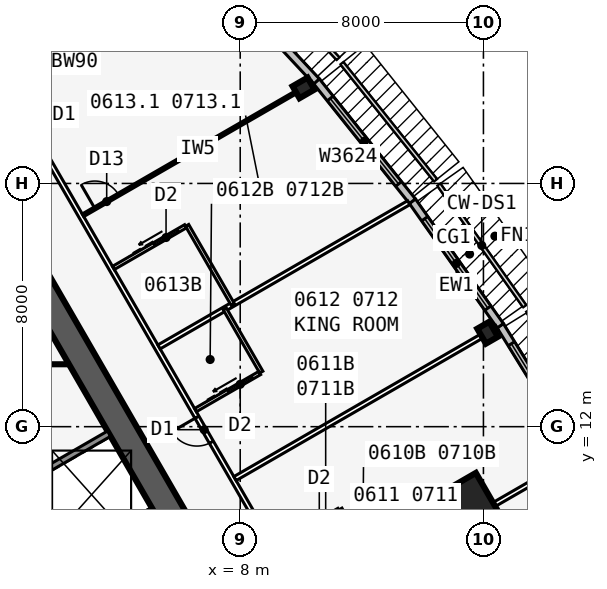
"""IFC4 building model, lengths in metres.
Left out: names, types, materials, properties, quantities, classifications, styles, units other than length and angle.
Written with IfcOpenShell. Run it as: python <this file> out.ifc"""

import sys

from ifc_helpers import new_model, si_unit, direction, frame, frame_2d, origin, origin_2d, place, context, subcontext, project, spatial, rectangle, i_section, extrude, element, fill, save


model = new_model("IFC4")
c1 = context("Model", 3, precision=1e-05, world=origin(), true_north=direction((0.0, 1.0)))
c2 = subcontext(c1, "Body", "Model", "MODEL_VIEW")
j1 = project(units=[si_unit("LENGTHUNIT", "METRE"), si_unit("PLANEANGLEUNIT", "RADIAN")], contexts=[c1])
p1 = place(None, origin())
s1 = spatial("IfcSite", under=j1, at=p1, CompositionType="ELEMENT")
p2 = place(p1, origin())
s2 = spatial("IfcBuilding", under=s1, at=p2, CompositionType="ELEMENT")
p3 = place(p2, frame((0.0, 0.0, 31.9)))
s3 = spatial("IfcBuildingStorey", under=s2, at=p3, CompositionType="ELEMENT", Elevation=31.9)
p4 = place(p3, frame((16.5, -9.526, 0.0), z_axis=(0.0, 0.0, 1.0), x_axis=(-0.499999749417, 0.866025548458, 0.0)))
e1 = element("IfcWall", 1, at=p4, inside=s3, PredefinedType="SHEAR", context=c2, shape_type="SweptSolid", body=[
    extrude(rectangle(XDim=33.0, YDim=0.9, at=frame_2d((16.5, 0.0))), origin(), (0.0, 0.0, 1.0), 3.4),
])
p5 = place(p4, frame((14.15, 0.0, 0.0)))
e2 = element("IfcOpeningElement", 2, at=p5, cuts=e1, PredefinedType="OPENING", context=c2, shape_type="SweptSolid", body=[
    extrude(rectangle(XDim=1.8, YDim=2.13, at=frame_2d((0.9, 1.065))), frame((0.0, 0.46, 0.0), z_axis=(0.0, -1.0, 0.0), x_axis=(1.0, 0.0, 0.0)), (0.0, 0.0, 1.0), 0.92),
])
p6 = place(p4, frame((12.6, 0.0, 0.0)))
e3 = element("IfcOpeningElement", 3, at=p6, cuts=e1, PredefinedType="OPENING", context=c2, shape_type="SweptSolid", body=[
    extrude(rectangle(XDim=1.0, YDim=2.13, at=frame_2d((0.5, 1.065))), frame((0.0, 0.46, 0.0), z_axis=(0.0, -1.0, 0.0), x_axis=(1.0, 0.0, 0.0)), (0.0, 0.0, 1.0), 0.92),
])
p7 = place(p3, frame((5.379, 2.586, 0.0), z_axis=(0.0, 0.0, 1.0), x_axis=(-0.500001375892, 0.866024609411, 0.0)))
e4 = element("IfcWall", 4, at=p7, inside=s3, PredefinedType="SOLIDWALL", context=c2, shape_type="SweptSolid", body=[
    extrude(rectangle(XDim=10.633, YDim=0.25, at=frame_2d((5.316, 0.0))), origin(), (0.0, 0.0, 1.0), 3.235),
])
p8 = place(p7, frame((9.164, 0.0, 0.0)))
e5 = element("IfcOpeningElement", 5, at=p8, cuts=e4, PredefinedType="OPENING", context=c2, shape_type="SweptSolid", body=[
    extrude(rectangle(XDim=0.9, YDim=2.13, at=frame_2d((0.45, 1.065))), frame((0.0, 0.135, 0.0), z_axis=(0.0, -1.0, 0.0), x_axis=(1.0, 0.0, 0.0)), (0.0, 0.0, 1.0), 0.27),
])
p9 = place(p7, frame((1.0, 0.0, 0.0)))
e6 = element("IfcOpeningElement", 6, at=p9, cuts=e4, PredefinedType="OPENING", context=c2, shape_type="SweptSolid", body=[
    extrude(rectangle(XDim=1.1, YDim=2.13, at=frame_2d((0.55, 1.065))), frame((0.0, 0.135, 0.0), z_axis=(0.0, -1.0, 0.0), x_axis=(1.0, 0.0, 0.0)), (0.0, 0.0, 1.0), 0.27),
])
p10 = place(p7, frame((3.9, 0.0, 0.0)))
e7 = element("IfcOpeningElement", 7, at=p10, cuts=e4, PredefinedType="OPENING", context=c2, shape_type="SweptSolid", body=[
    extrude(rectangle(XDim=1.1, YDim=2.13, at=frame_2d((0.55, 1.065))), frame((0.0, 0.135, 0.0), z_axis=(0.0, -1.0, 0.0), x_axis=(1.0, 0.0, 0.0)), (0.0, 0.0, 1.0), 0.27),
])
p11 = place(p7, frame((6.8, 0.0, 0.0)))
e8 = element("IfcOpeningElement", 8, at=p11, cuts=e4, PredefinedType="OPENING", context=c2, shape_type="SweptSolid", body=[
    extrude(rectangle(XDim=1.1, YDim=2.13, at=frame_2d((0.55, 1.065))), frame((0.0, 0.135, 0.0), z_axis=(0.0, -1.0, 0.0), x_axis=(1.0, 0.0, 0.0)), (0.0, 0.0, 1.0), 0.27),
])
for number, where, z_axis, x_axis in (
    (9, (2.429, 7.696, 0.0), (0.0, 0.0, 1.0), (0.866, 0.5, 0.0)),
    (10, (0.979, 10.207, 0.0), (0.0, 0.0, 1.0), (0.866, 0.5, 0.0)),
):
    element("IfcWall", number, at=place(p3, frame(where, z_axis=z_axis, x_axis=x_axis)), inside=s3, PredefinedType="SOLIDWALL", context=c2, shape_type="SweptSolid", body=[
        extrude(rectangle(XDim=3.125, YDim=0.2, at=frame_2d((1.562, 0.0))), origin(), (0.0, 0.0, 1.0), 3.235),
    ])
for number, where, z_axis, x_axis in (
    (11, (16.137, 15.09, 0.0), (0.0, 0.0, 1.0), (0.866, 0.5, 0.0)),
    (12, (10.083, 23.142, 0.0), (0.0, 0.0, 1.0), (-0.5, 0.866, 0.0)),
):
    element("IfcColumn", number, at=place(p3, frame(where, z_axis=z_axis, x_axis=x_axis)), inside=s3, PredefinedType="COLUMN", context=c2, shape_type="SweptSolid", body=[
        extrude(i_section(OverallWidth=0.455, OverallDepth=0.569, WebThickness=0.078, FlangeThickness=0.125, at=origin_2d()), origin(), (0.0, 0.0, 1.0), 3.4),
    ])
p12 = place(p3, frame((15.312, 8.84, 0.0), z_axis=(0.0, 0.0, 1.0), x_axis=(0.866025403784, 0.5, 0.0)))
e13 = element("IfcColumn", 13, at=p12, inside=s3, PredefinedType="COLUMN", context=c2, shape_type="SweptSolid", body=[
    extrude(rectangle(XDim=2.4, YDim=2.4, at=origin_2d()), origin(), (0.0, 0.0, 1.0), 3.4),
])
p13 = place(p3, frame((19.182, 11.071, 0.0), z_axis=(0.0, 0.0, 1.0), x_axis=(-0.526132807704, 0.850402415717, 0.0)))
e14 = element("IfcWall", 14, at=p13, inside=s3, PredefinedType="STANDARD", context=c2, shape_type="SweptSolid", body=[
    extrude(rectangle(XDim=5.002, YDim=0.25, at=frame_2d((2.501, 0.0))), origin(), (0.0, 0.0, 1.0), 3.235),
])
p14 = place(p13, frame((0.701, 0.0, 0.45)))
e15 = element("IfcOpeningElement", 15, at=p14, cuts=e14, PredefinedType="OPENING", context=c2, shape_type="SweptSolid", body=[
    extrude(rectangle(XDim=3.6, YDim=2.4, at=frame_2d((1.8, 1.2))), frame((0.0, 0.135, 0.0), z_axis=(0.0, -1.0, 0.0), x_axis=(1.0, 0.0, 0.0)), (0.0, 0.0, 1.0), 0.27),
])
p15 = place(p3, frame((16.555, 15.318, 0.0), z_axis=(0.0, 0.0, 1.0), x_axis=(-0.5766431066, 0.81699616132, 0.0)))
e16 = element("IfcWall", 16, at=p15, inside=s3, PredefinedType="STANDARD", context=c2, shape_type="SweptSolid", body=[
    extrude(rectangle(XDim=5.021, YDim=0.25, at=frame_2d((2.51, 0.0))), origin(), (0.0, 0.0, 1.0), 3.235),
])
p16 = place(p15, frame((0.71, 0.0, 0.45)))
e17 = element("IfcOpeningElement", 17, at=p16, cuts=e16, PredefinedType="OPENING", context=c2, shape_type="SweptSolid", body=[
    extrude(rectangle(XDim=3.6, YDim=2.4, at=frame_2d((1.8, 1.2))), frame((0.0, 0.135, 0.0), z_axis=(0.0, -1.0, 0.0), x_axis=(1.0, 0.0, 0.0)), (0.0, 0.0, 1.0), 0.27),
])
p17 = place(p3, frame((13.664, 19.414, 0.0), z_axis=(0.0, 0.0, 1.0), x_axis=(-0.624594965756, 0.780948864364, 0.0)))
e18 = element("IfcWall", 18, at=p17, inside=s3, PredefinedType="STANDARD", context=c2, shape_type="SweptSolid", body=[
    extrude(rectangle(XDim=5.058, YDim=0.25, at=frame_2d((2.529, 0.0))), origin(), (0.0, 0.0, 1.0), 3.235),
])
p18 = place(p17, frame((0.729, 0.0, 0.45)))
e19 = element("IfcOpeningElement", 19, at=p18, cuts=e18, PredefinedType="OPENING", context=c2, shape_type="SweptSolid", body=[
    extrude(rectangle(XDim=3.6, YDim=2.4, at=frame_2d((1.8, 1.2))), frame((0.0, 0.135, 0.0), z_axis=(0.0, -1.0, 0.0), x_axis=(1.0, 0.0, 0.0)), (0.0, 0.0, 1.0), 0.27),
])
p19 = place(p3, frame((10.511, 23.357, 0.0), z_axis=(0.0, 0.0, 1.0), x_axis=(-0.682289646561, 0.731081964075, 0.0)))
e20 = element("IfcWall", 20, at=p19, inside=s3, PredefinedType="STANDARD", context=c2, shape_type="SweptSolid", body=[
    extrude(rectangle(XDim=8.211, YDim=0.25, at=frame_2d((4.105, 0.0))), origin(), (0.0, 0.0, 1.0), 3.235),
])
p20 = place(p19, frame((2.006, 0.0, 0.45)))
e21 = element("IfcOpeningElement", 21, at=p20, cuts=e20, PredefinedType="OPENING", context=c2, shape_type="SweptSolid", body=[
    extrude(rectangle(XDim=4.2, YDim=2.4, at=frame_2d((2.1, 1.2))), frame((0.0, 0.135, 0.0), z_axis=(0.0, -1.0, 0.0), x_axis=(1.0, 0.0, 0.0)), (0.0, 0.0, 1.0), 0.27),
])
p21 = place(p3, frame((20.027, -10.985, 0.0), z_axis=(0.0, 0.0, 1.0), x_axis=(-0.500001677587, 0.866024435227, 0.0)))
e22 = element("IfcWall", 22, at=p21, inside=s3, PredefinedType="PARTITIONING", context=c2, shape_type="SweptSolid", body=[
    extrude(rectangle(XDim=39.054, YDim=0.15, at=frame_2d((19.527, 0.0))), origin(), (0.0, 0.0, 1.0), 3.235),
])
p22 = place(p21, frame((0.352, 0.0, 0.0)))
e23 = element("IfcOpeningElement", 23, at=p22, cuts=e22, PredefinedType="OPENING", context=c2, shape_type="SweptSolid", body=[
    extrude(rectangle(XDim=0.95, YDim=2.13, at=frame_2d((0.475, 1.065))), frame((0.0, 0.085, 0.0), z_axis=(0.0, -1.0, 0.0), x_axis=(1.0, 0.0, 0.0)), (0.0, 0.0, 1.0), 0.17),
])
p23 = place(p21, frame((5.952, 0.0, 0.0)))
e24 = element("IfcOpeningElement", 24, at=p23, cuts=e22, PredefinedType="OPENING", context=c2, shape_type="SweptSolid", body=[
    extrude(rectangle(XDim=0.95, YDim=2.13, at=frame_2d((0.475, 1.065))), frame((0.0, 0.085, 0.0), z_axis=(0.0, -1.0, 0.0), x_axis=(1.0, 0.0, 0.0)), (0.0, 0.0, 1.0), 0.17),
])
p24 = place(p21, frame((12.152, 0.0, 0.0)))
e25 = element("IfcOpeningElement", 25, at=p24, cuts=e22, PredefinedType="OPENING", context=c2, shape_type="SweptSolid", body=[
    extrude(rectangle(XDim=0.95, YDim=2.13, at=frame_2d((0.475, 1.065))), frame((0.0, 0.085, 0.0), z_axis=(0.0, -1.0, 0.0), x_axis=(1.0, 0.0, 0.0)), (0.0, 0.0, 1.0), 0.17),
])
p25 = place(p21, frame((15.952, 0.0, 0.0)))
e26 = element("IfcOpeningElement", 26, at=p25, cuts=e22, PredefinedType="OPENING", context=c2, shape_type="SweptSolid", body=[
    extrude(rectangle(XDim=0.95, YDim=2.13, at=frame_2d((0.475, 1.065))), frame((0.0, 0.085, 0.0), z_axis=(0.0, -1.0, 0.0), x_axis=(1.0, 0.0, 0.0)), (0.0, 0.0, 1.0), 0.17),
])
p26 = place(p21, frame((22.152, 0.0, 0.0)))
e27 = element("IfcOpeningElement", 27, at=p26, cuts=e22, PredefinedType="OPENING", context=c2, shape_type="SweptSolid", body=[
    extrude(rectangle(XDim=0.95, YDim=2.13, at=frame_2d((0.475, 1.065))), frame((0.0, 0.085, 0.0), z_axis=(0.0, -1.0, 0.0), x_axis=(1.0, 0.0, 0.0)), (0.0, 0.0, 1.0), 0.17),
])
p27 = place(p21, frame((25.952, 0.0, 0.0)))
e28 = element("IfcOpeningElement", 28, at=p27, cuts=e22, PredefinedType="OPENING", context=c2, shape_type="SweptSolid", body=[
    extrude(rectangle(XDim=0.95, YDim=2.13, at=frame_2d((0.475, 1.065))), frame((0.0, 0.085, 0.0), z_axis=(0.0, -1.0, 0.0), x_axis=(1.0, 0.0, 0.0)), (0.0, 0.0, 1.0), 0.17),
])
p28 = place(p21, frame((36.546, 0.0, 0.0)))
e29 = element("IfcOpeningElement", 29, at=p28, cuts=e22, PredefinedType="OPENING", context=c2, shape_type="SweptSolid", body=[
    extrude(rectangle(XDim=0.95, YDim=2.13, at=frame_2d((0.475, 1.065))), frame((0.0, 0.085, 0.0), z_axis=(0.0, -1.0, 0.0), x_axis=(1.0, 0.0, 0.0)), (0.0, 0.0, 1.0), 0.17),
])
p29 = place(p3, frame((10.329, 5.963, 0.0), z_axis=(0.0, 0.0, 1.0), x_axis=(0.866021688545, 0.500006434927, 0.0)))
e30 = element("IfcWall", 30, at=p29, inside=s3, PredefinedType="PARTITIONING", context=c2, shape_type="SweptSolid", body=[
    extrude(rectangle(XDim=10.096, YDim=0.15, at=frame_2d((5.048, 0.0))), origin(), (0.0, 0.0, 1.0), 2.389),
])
p30 = place(p3, frame((7.829, 10.293, 0.0), z_axis=(0.0, 0.0, 1.0), x_axis=(0.866016302457, 0.50001576363, 0.0)))
e31 = element("IfcWall", 31, at=p30, inside=s3, PredefinedType="PARTITIONING", context=c2, shape_type="SweptSolid", body=[
    extrude(rectangle(XDim=9.943, YDim=0.15, at=frame_2d((4.972, 0.0))), origin(), (0.0, 0.0, 1.0), 2.389),
])
p31 = place(p3, frame((5.329, 14.623, 0.0), z_axis=(0.0, 0.0, 1.0), x_axis=(0.866018409083, 0.500012114982, 0.0)))
e32 = element("IfcWall", 32, at=p31, inside=s3, PredefinedType="PARTITIONING", context=c2, shape_type="SweptSolid", body=[
    extrude(rectangle(XDim=9.485, YDim=0.15, at=frame_2d((4.742, 0.0))), origin(), (0.0, 0.0, 1.0), 2.389),
])
p32 = place(p3, frame((2.829, 18.954, 0.0), z_axis=(0.0, 0.0, 1.0), x_axis=(0.866020536561, 0.500008430184, 0.0)))
e33 = element("IfcWall", 33, at=p32, inside=s3, PredefinedType="PARTITIONING", context=c2, shape_type="SweptSolid", body=[
    extrude(rectangle(XDim=8.72, YDim=0.1, at=frame_2d((4.36, 0.0))), origin(), (0.0, 0.0, 1.0), 2.389),
])
p33 = place(p32, frame((0.45, 0.0, 0.0)))
e34 = element("IfcOpeningElement", 34, at=p33, cuts=e33, PredefinedType="OPENING", context=c2, shape_type="SweptSolid", body=[
    extrude(rectangle(XDim=0.9, YDim=2.13, at=frame_2d((0.45, 1.065))), frame((0.0, 0.06, 0.0), z_axis=(0.0, -1.0, 0.0), x_axis=(1.0, 0.0, 0.0)), (0.0, 0.0, 1.0), 0.12),
])
p34 = place(p3, frame((12.493, 7.213, 0.0), z_axis=(0.0, 0.0, 1.0), x_axis=(-0.500001309137, 0.866024647952, 0.0)))
e35 = element("IfcWall", 35, at=p34, inside=s3, PredefinedType="PLUMBINGWALL", context=c2, shape_type="SweptSolid", body=[
    extrude(rectangle(XDim=2.4, YDim=0.12, at=frame_2d((1.2, 0.0))), origin(), (0.0, 0.0, 1.0), 3.235),
])
p35 = place(p3, frame((9.128, 8.042, 0.0), z_axis=(0.0, 0.0, 1.0), x_axis=(0.866005645448, 0.500034220881, 0.0)))
e36 = element("IfcWall", 36, at=p35, inside=s3, PredefinedType="PLUMBINGWALL", context=c2, shape_type="SweptSolid", body=[
    extrude(rectangle(XDim=2.44, YDim=0.12, at=frame_2d((1.22, 0.0))), origin(), (0.0, 0.0, 1.0), 3.235),
])
p36 = place(p35, frame((1.25, 0.0, 0.0)))
e37 = element("IfcOpeningElement", 37, at=p36, cuts=e36, PredefinedType="OPENING", context=c2, shape_type="SweptSolid", body=[
    extrude(rectangle(XDim=0.9, YDim=2.13, at=frame_2d((0.45, 1.065))), frame((0.0, 0.07, 0.0), z_axis=(0.0, -1.0, 0.0), x_axis=(1.0, 0.0, 0.0)), (0.0, 0.0, 1.0), 0.14),
])
p37 = place(p3, frame((8.694, 13.795, 0.0), z_axis=(0.0, 0.0, 1.0), x_axis=(-0.500077600433, 0.865980596518, 0.0)))
e38 = element("IfcWall", 38, at=p37, inside=s3, PredefinedType="PLUMBINGWALL", context=c2, shape_type="SweptSolid", body=[
    extrude(rectangle(XDim=2.4, YDim=0.12, at=frame_2d((1.2, 0.0))), origin(), (0.0, 0.0, 1.0), 3.235),
])
p38 = place(p3, frame((6.529, 12.545, 0.0), z_axis=(0.0, 0.0, 1.0), x_axis=(0.866023955769, 0.500002508028, 0.0)))
e39 = element("IfcWall", 39, at=p38, inside=s3, PredefinedType="PLUMBINGWALL", context=c2, shape_type="SweptSolid", body=[
    extrude(rectangle(XDim=2.44, YDim=0.12, at=frame_2d((1.22, 0.0))), origin(), (0.0, 0.0, 1.0), 3.235),
])
p39 = place(p38, frame((1.25, 0.0, 0.0)))
e40 = element("IfcOpeningElement", 40, at=p39, cuts=e39, PredefinedType="OPENING", context=c2, shape_type="SweptSolid", body=[
    extrude(rectangle(XDim=0.9, YDim=2.13, at=frame_2d((0.45, 1.065))), frame((0.0, 0.07, 0.0), z_axis=(0.0, -1.0, 0.0), x_axis=(1.0, 0.0, 0.0)), (0.0, 0.0, 1.0), 0.14),
])
p40 = place(p3, frame((7.753, 16.023, 0.0), z_axis=(0.0, 0.0, 1.0), x_axis=(-0.499990139034, 0.866031096941, 0.0)))
e41 = element("IfcWall", 41, at=p40, inside=s3, PredefinedType="PLUMBINGWALL", context=c2, shape_type="SweptSolid", body=[
    extrude(rectangle(XDim=3.0, YDim=0.12, at=frame_2d((1.5, 0.0))), origin(), (0.0, 0.0, 1.0), 3.235),
])
p41 = place(p3, frame((3.829, 17.221, 0.0), z_axis=(0.0, 0.0, 1.0), x_axis=(0.865997131366, 0.500048966069, 0.0)))
e42 = element("IfcWall", 42, at=p41, inside=s3, PredefinedType="PLUMBINGWALL", context=c2, shape_type="SweptSolid", body=[
    extrude(rectangle(XDim=2.74, YDim=0.12, at=frame_2d((1.37, 0.0))), origin(), (0.0, 0.0, 1.0), 3.235),
])
p42 = place(p41, frame((1.55, 0.0, 0.0)))
e43 = element("IfcOpeningElement", 43, at=p42, cuts=e42, PredefinedType="OPENING", context=c2, shape_type="SweptSolid", body=[
    extrude(rectangle(XDim=0.9, YDim=2.13, at=frame_2d((0.45, 1.065))), frame((0.0, 0.07, 0.0), z_axis=(0.0, -1.0, 0.0), x_axis=(1.0, 0.0, 0.0)), (0.0, 0.0, 1.0), 0.14),
])
p43 = place(p3, frame((-2.367, 14.052, 0.0), z_axis=(0.0, 0.0, 1.0), x_axis=(1.0, 0.0, 0.0)))
e44 = element("IfcWall", 44, at=p43, inside=s3, PredefinedType="PARTITIONING", context=c2, shape_type="SweptSolid", body=[
    extrude(rectangle(XDim=4.734, YDim=0.1, at=frame_2d((2.367, 0.0))), origin(), (0.0, 0.0, 1.0), 3.235),
])
p44 = place(p43, frame((1.917, 0.0, 0.0)))
e45 = element("IfcOpeningElement", 45, at=p44, cuts=e44, PredefinedType="OPENING", context=c2, shape_type="SweptSolid", body=[
    extrude(rectangle(XDim=0.9, YDim=2.13, at=frame_2d((0.45, 1.065))), frame((0.0, 0.06, 0.0), z_axis=(0.0, -1.0, 0.0), x_axis=(1.0, 0.0, 0.0)), (0.0, 0.0, 1.0), 0.12),
])
p45 = place(p14, origin())
e46 = element("IfcWindow", 46, at=p45, inside=s3, PartitioningType="SINGLE_PANEL", PredefinedType="WINDOW", context=c2, shape_type="SweptSolid", body=[
    extrude(rectangle(XDim=3.6, YDim=2.4, at=frame_2d((1.8, 1.2))), frame((0.0, 0.03, 0.0), z_axis=(0.0, -1.0, 0.0), x_axis=(1.0, 0.0, 0.0)), (0.0, 0.0, 1.0), 0.06),
])
fill(e15, e46)
p46 = place(p16, origin())
e47 = element("IfcWindow", 47, at=p46, inside=s3, PartitioningType="SINGLE_PANEL", PredefinedType="WINDOW", context=c2, shape_type="SweptSolid", body=[
    extrude(rectangle(XDim=3.6, YDim=2.4, at=frame_2d((1.8, 1.2))), frame((0.0, 0.03, 0.0), z_axis=(0.0, -1.0, 0.0), x_axis=(1.0, 0.0, 0.0)), (0.0, 0.0, 1.0), 0.06),
])
fill(e17, e47)
p47 = place(p18, origin())
e48 = element("IfcWindow", 48, at=p47, inside=s3, PartitioningType="SINGLE_PANEL", PredefinedType="WINDOW", context=c2, shape_type="SweptSolid", body=[
    extrude(rectangle(XDim=3.6, YDim=2.4, at=frame_2d((1.8, 1.2))), frame((0.0, 0.03, 0.0), z_axis=(0.0, -1.0, 0.0), x_axis=(1.0, 0.0, 0.0)), (0.0, 0.0, 1.0), 0.06),
])
fill(e19, e48)
p48 = place(p33, origin())
e49 = element("IfcDoor", 49, at=p48, inside=s3, OperationType="SINGLE_SWING_LEFT", PredefinedType="DOOR", context=c2, shape_type="SweptSolid", body=[
    extrude(rectangle(XDim=0.9, YDim=2.13, at=frame_2d((0.45, 1.065))), frame((0.0, 0.025, 0.0), z_axis=(0.0, -1.0, 0.0), x_axis=(1.0, 0.0, 0.0)), (0.0, 0.0, 1.0), 0.05),
])
fill(e34, e49)
p49 = place(p39, origin())
e50 = element("IfcDoor", 50, at=p49, inside=s3, OperationType="SLIDING_TO_LEFT", PredefinedType="DOOR", context=c2, shape_type="SweptSolid", body=[
    extrude(rectangle(XDim=0.9, YDim=2.13, at=frame_2d((0.45, 1.065))), frame((0.0, 0.025, 0.0), z_axis=(0.0, -1.0, 0.0), x_axis=(1.0, 0.0, 0.0)), (0.0, 0.0, 1.0), 0.05),
])
fill(e40, e50)
p50 = place(p27, origin())
e51 = element("IfcDoor", 51, at=p50, inside=s3, OperationType="SINGLE_SWING_RIGHT", PredefinedType="DOOR", context=c2, shape_type="SweptSolid", body=[
    extrude(rectangle(XDim=0.95, YDim=2.13, at=frame_2d((0.475, 1.065))), frame((0.0, 0.025, 0.0), z_axis=(0.0, -1.0, 0.0), x_axis=(1.0, 0.0, 0.0)), (0.0, 0.0, 1.0), 0.05),
])
fill(e28, e51)
p51 = place(p42, origin())
e52 = element("IfcDoor", 52, at=p51, inside=s3, OperationType="SLIDING_TO_LEFT", PredefinedType="DOOR", context=c2, shape_type="SweptSolid", body=[
    extrude(rectangle(XDim=0.9, YDim=2.13, at=frame_2d((0.45, 1.065))), frame((0.0, 0.025, 0.0), z_axis=(0.0, -1.0, 0.0), x_axis=(1.0, 0.0, 0.0)), (0.0, 0.0, 1.0), 0.05),
])
fill(e43, e52)
p52 = place(p11, origin())
e53 = element("IfcDoor", 53, at=p52, inside=s3, OperationType="DOUBLE_DOOR_SLIDING", PredefinedType="USERDEFINED", context=c2, shape_type="SweptSolid", body=[
    extrude(rectangle(XDim=1.1, YDim=2.13, at=frame_2d((0.55, 1.065))), frame((0.0, 0.025, 0.0), z_axis=(0.0, -1.0, 0.0), x_axis=(1.0, 0.0, 0.0)), (0.0, 0.0, 1.0), 0.05),
])
fill(e8, e53)
save(model, sys.argv[1])
